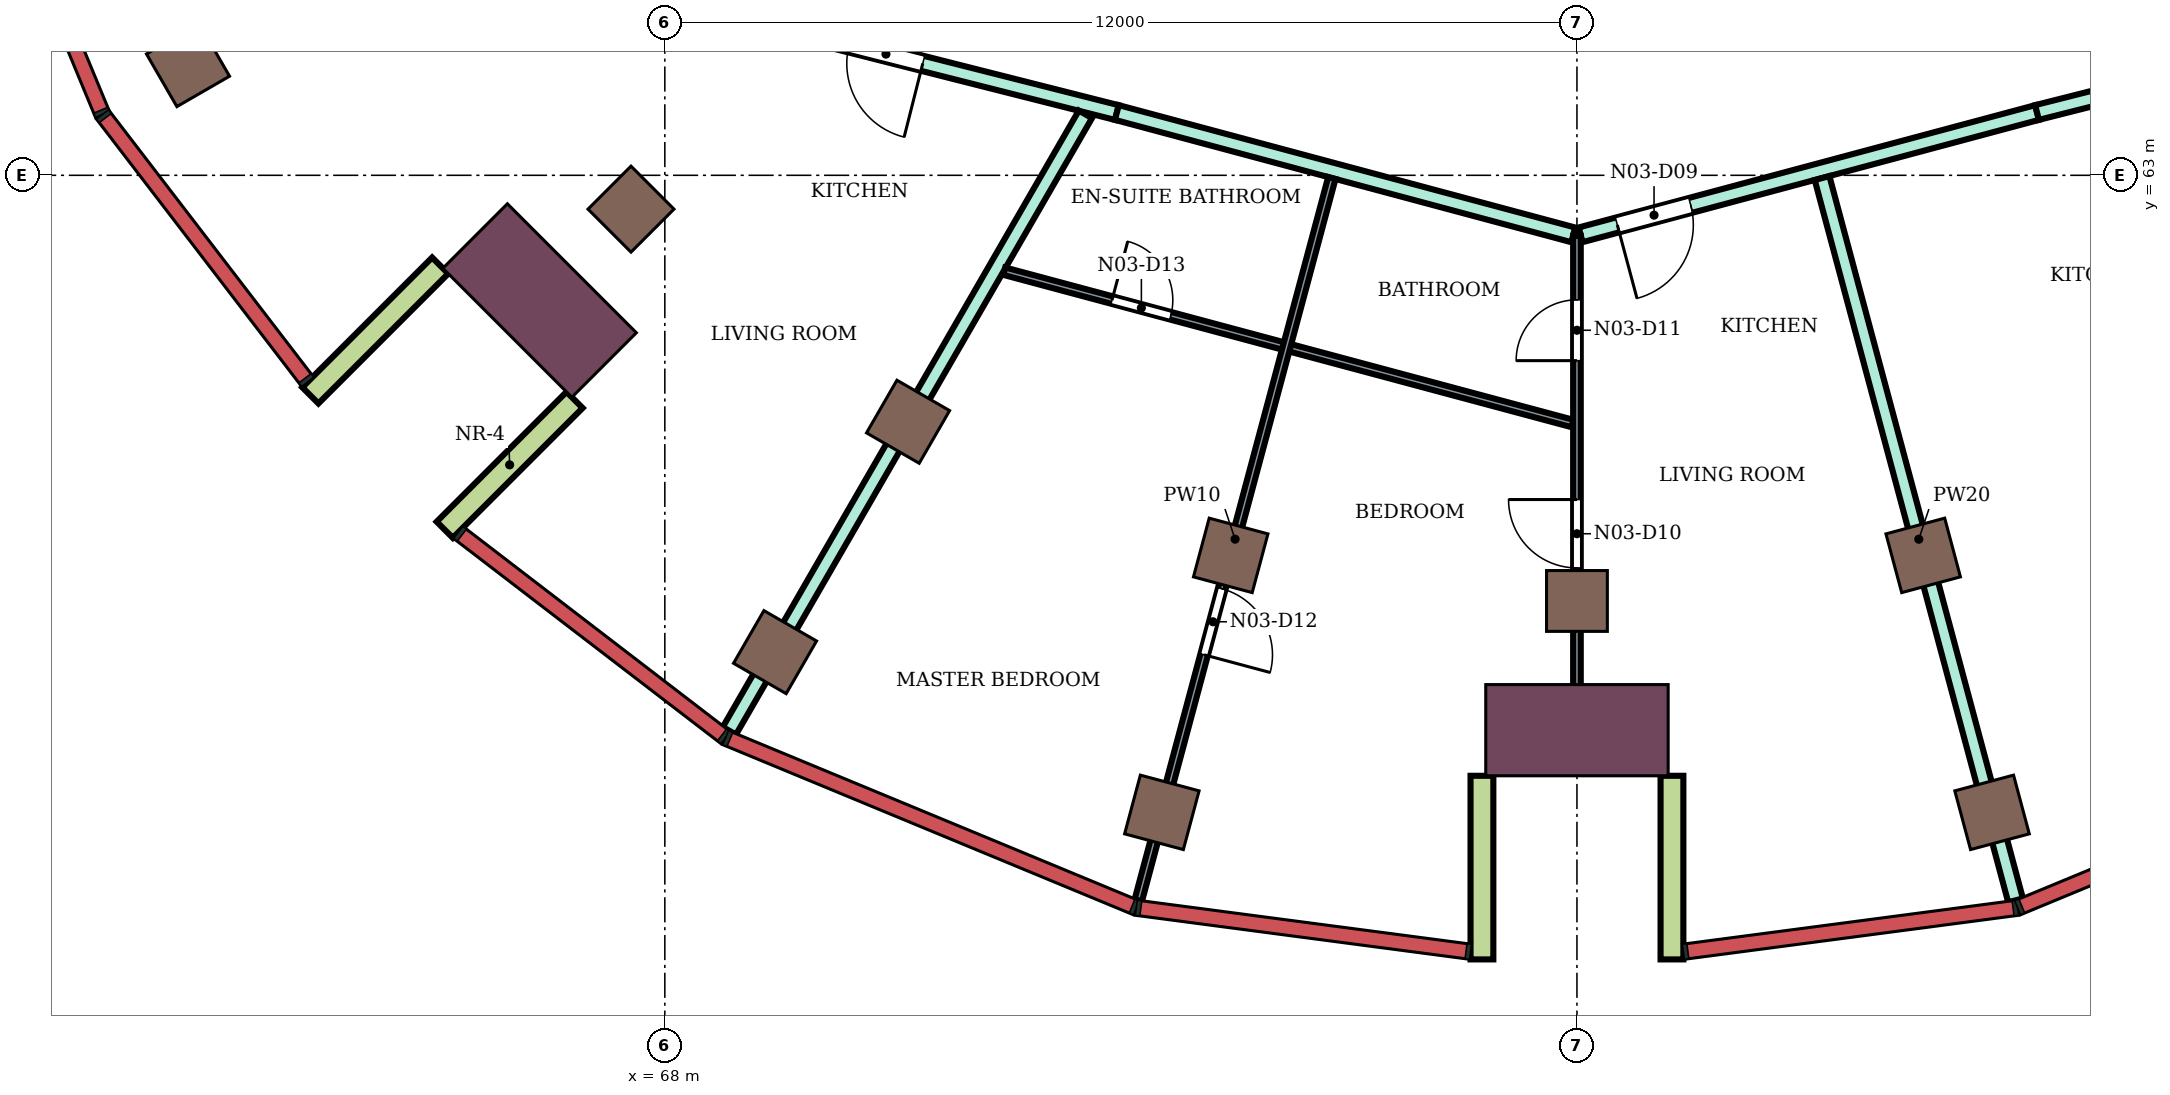
"""IFC4 building model, lengths in metres.
Left out: names, types, materials, properties, quantities, classifications, styles, units other than length and angle.
Written with IfcOpenShell. Run it as: python <this file> out.ifc"""

import sys

from ifc_helpers import new_model, si_unit, direction, frame, frame_2d, origin, origin_2d, place, context, subcontext, project, spatial, rectangle, extrude, element, fill, save


model = new_model("IFC4")
c1 = context("Model", 3, precision=1e-05, world=origin(), true_north=direction((0.0, 1.0)))
c2 = subcontext(c1, "Body", "Model", "MODEL_VIEW")
j1 = project(units=[si_unit("LENGTHUNIT", "METRE"), si_unit("PLANEANGLEUNIT", "RADIAN")], contexts=[c1])
p1 = place(None, origin())
s1 = spatial("IfcSite", under=j1, at=p1, CompositionType="ELEMENT")
p2 = place(p1, origin())
s2 = spatial("IfcBuilding", under=s1, at=p2, CompositionType="ELEMENT")
p3 = place(p2, frame((0.0, 0.0, 300.9)))
s3 = spatial("IfcBuildingStorey", under=s2, at=p3, CompositionType="ELEMENT", Elevation=300.9)
for number, where, z_axis, x_axis in (
    (1, (61.727, 64.45, 0.0), (0.0, 0.0, 1.0), (-0.866, -0.5, 0.0)),
    (2, (69.45, 56.727, 0.0), (0.0, 0.0, 1.0), (-0.5, -0.866, 0.0)),
    (3, (74.539, 54.619, 0.0), (0.0, 0.0, 1.0), (-0.259, -0.966, 0.0)),
    (4, (85.461, 54.619, 0.0), (0.0, 0.0, 1.0), (0.259, -0.966, 0.0)),
    (5, (67.555, 62.555, 0.0), (0.0, 0.0, 1.0), (-0.707, -0.707, 0.0)),
    (6, (71.2, 59.758, 0.0), (0.0, 0.0, 1.0), (-0.5, -0.866, 0.0)),
    (7, (75.445, 58.0, 0.0), (0.0, 0.0, 1.0), (-0.259, -0.966, 0.0)),
    (8, (80.0, 57.4, 0.0), (0.0, 0.0, 1.0), (0.0, -1.0, 0.0)),
    (9, (84.555, 58.0, 0.0), (0.0, 0.0, 1.0), (0.259, -0.966, 0.0)),
):
    element("IfcColumn", number, at=place(p3, frame(where, z_axis=z_axis, x_axis=x_axis)), inside=s3, PredefinedType="COLUMN", context=c2, shape_type="SweptSolid", body=[
        extrude(rectangle(XDim=0.8, YDim=0.8, at=origin_2d()), origin(), (0.0, 0.0, 1.0), 4.2),
    ])
for number, where, z_axis, x_axis in (
    (10, (66.353, 61.353, 0.0), (0.0, 0.0, 1.0), (-0.707, -0.707, 0.0)),
    (11, (80.0, 55.7, 0.0), (0.0, 0.0, 1.0), (0.0, -1.0, 0.0)),
):
    element("IfcColumn", number, at=place(p3, frame(where, z_axis=z_axis, x_axis=x_axis)), inside=s3, PredefinedType="COLUMN", context=c2, shape_type="SweptSolid", body=[
        extrude(rectangle(XDim=1.2, YDim=2.4, at=origin_2d()), origin(), (0.0, 0.0, 1.0), 4.2),
    ])
for number, where, z_axis, x_axis in (
    (12, (65.045, 61.812, 0.0), (0.0, 0.0, 1.0), (-0.707, -0.707, 0.0)),
    (13, (66.812, 60.045, 0.0), (0.0, 0.0, 1.0), (-0.707, -0.707, 0.0)),
    (14, (78.75, 55.1, 0.0), (0.0, 0.0, 1.0), (0.0, -1.0, 0.0)),
    (15, (81.25, 55.1, 0.0), (0.0, 0.0, 1.0), (0.0, -1.0, 0.0)),
):
    element("IfcWall", number, at=place(p3, frame(where, z_axis=z_axis, x_axis=x_axis)), inside=s3, PredefinedType="NOTDEFINED", context=c2, shape_type="SweptSolid", body=[
        extrude(rectangle(XDim=2.416, YDim=0.3, at=frame_2d((1.208, 0.0))), origin(), (0.0, 0.0, 1.0), 4.2),
    ])
p4 = place(p3, frame((68.201, 65.28, 0.0), z_axis=(0.0, 0.0, 1.0), x_axis=(0.969421088032, -0.245403247897, 0.0)))
e16 = element("IfcWall", 16, at=p4, inside=s3, PredefinedType="PARTITIONING", context=c2, shape_type="SweptSolid", body=[
    extrude(rectangle(XDim=5.927, YDim=0.2, at=frame_2d((2.964, 0.0))), origin(), (0.0, 0.0, 1.0), 3.75),
])
p5 = place(p4, frame((2.293, 0.0, 0.0)))
e17 = element("IfcOpeningElement", 17, at=p5, cuts=e16, PredefinedType="OPENING", context=c2, shape_type="SweptSolid", body=[
    extrude(rectangle(XDim=1.0, YDim=2.1, at=frame_2d((0.5, 1.05))), frame((0.0, 0.11, 0.0), z_axis=(0.0, -1.0, 0.0), x_axis=(1.0, 0.0, 0.0)), (0.0, 0.0, 1.0), 0.22),
])
p6 = place(p3, frame((68.849, 55.692, 0.0), z_axis=(0.0, 0.0, 1.0), x_axis=(0.50011732958, 0.865957652922, 0.0)))
e18 = element("IfcWall", 18, at=p6, inside=s3, PredefinedType="PARTITIONING", context=c2, shape_type="SweptSolid", body=[
    extrude(rectangle(XDim=9.365, YDim=0.2, at=frame_2d((4.683, 0.0))), origin(), (0.0, 0.0, 1.0), 3.75),
])
p7 = place(p3, frame((73.947, 63.826, 0.0), z_axis=(0.0, 0.0, 1.0), x_axis=(0.965908253407, -0.258884619088, 0.0)))
e19 = element("IfcWall", 19, at=p7, inside=s3, PredefinedType="PARTITIONING", context=c2, shape_type="SweptSolid", body=[
    extrude(rectangle(XDim=6.217, YDim=0.2, at=frame_2d((3.108, 0.0))), origin(), (0.0, 0.0, 1.0), 3.75),
])
p8 = place(p3, frame((80.048, 62.217, 0.0), z_axis=(0.0, 0.0, 1.0), x_axis=(0.965937709386, 0.258774692708, 0.0)))
e20 = element("IfcWall", 20, at=p8, inside=s3, PredefinedType="PARTITIONING", context=c2, shape_type="SweptSolid", body=[
    extrude(rectangle(XDim=6.216, YDim=0.2, at=frame_2d((3.108, 0.0))), origin(), (0.0, 0.0, 1.0), 3.75),
])
p9 = place(p8, frame((0.5, 0.0, 0.0)))
e21 = element("IfcOpeningElement", 21, at=p9, cuts=e20, PredefinedType="OPENING", context=c2, shape_type="SweptSolid", body=[
    extrude(rectangle(XDim=1.0, YDim=2.1, at=frame_2d((0.5, 1.05))), frame((0.0, 0.11, 0.0), z_axis=(0.0, -1.0, 0.0), x_axis=(1.0, 0.0, 0.0)), (0.0, 0.0, 1.0), 0.22),
])
p10 = place(p3, frame((83.225, 62.963, 0.0), z_axis=(0.0, 0.0, 1.0), x_axis=(0.258782398991, -0.96593564484, 0.0)))
e22 = element("IfcWall", 22, at=p10, inside=s3, PredefinedType="PARTITIONING", context=c2, shape_type="SweptSolid", body=[
    extrude(rectangle(XDim=9.837, YDim=0.2, at=frame_2d((4.918, 0.0))), origin(), (0.0, 0.0, 1.0), 3.75),
])
p11 = place(p3, frame((86.053, 63.826, 0.0), z_axis=(0.0, 0.0, 1.0), x_axis=(0.969480070232, 0.245170131586, 0.0)))
e23 = element("IfcWall", 23, at=p11, inside=s3, PredefinedType="PARTITIONING", context=c2, shape_type="SweptSolid", body=[
    extrude(rectangle(XDim=5.907, YDim=0.2, at=frame_2d((2.954, 0.0))), origin(), (0.0, 0.0, 1.0), 3.75),
])
p12 = place(p11, frame((2.464, 0.0, 0.0)))
e24 = element("IfcOpeningElement", 24, at=p12, cuts=e23, PredefinedType="OPENING", context=c2, shape_type="SweptSolid", body=[
    extrude(rectangle(XDim=1.0, YDim=2.1, at=frame_2d((0.5, 1.05))), frame((0.0, 0.11, 0.0), z_axis=(0.0, -1.0, 0.0), x_axis=(1.0, 0.0, 0.0)), (0.0, 0.0, 1.0), 0.22),
])
p13 = place(p3, frame((72.465, 61.739, 0.0), z_axis=(0.0, 0.0, 1.0), x_axis=(0.965899611634, -0.258916859715, 0.0)))
e25 = element("IfcWall", 25, at=p13, inside=s3, PredefinedType="PARTITIONING", context=c2, shape_type="SweptSolid", body=[
    extrude(rectangle(XDim=7.74, YDim=0.1, at=frame_2d((3.87, 0.0))), origin(), (0.0, 0.0, 1.0), 3.75),
])
p14 = place(p13, frame((1.468, 0.0, 0.0)))
e26 = element("IfcOpeningElement", 26, at=p14, cuts=e25, PredefinedType="OPENING", context=c2, shape_type="SweptSolid", body=[
    extrude(rectangle(XDim=0.8, YDim=2.1, at=frame_2d((0.4, 1.05))), frame((0.0, 0.06, 0.0), z_axis=(0.0, -1.0, 0.0), x_axis=(1.0, 0.0, 0.0)), (0.0, 0.0, 1.0), 0.12),
])
p15 = place(p3, frame((74.229, 53.462, 0.0), z_axis=(0.0, 0.0, 1.0), x_axis=(0.258810097991, 0.965928223616, 0.0)))
e27 = element("IfcWall", 27, at=p15, inside=s3, PredefinedType="PARTITIONING", context=c2, shape_type="SweptSolid", body=[
    extrude(rectangle(XDim=9.838, YDim=0.1, at=frame_2d((4.919, 0.0))), origin(), (0.0, 0.0, 1.0), 3.75),
])
p16 = place(p15, frame((3.344, 0.0, 0.0)))
e28 = element("IfcOpeningElement", 28, at=p16, cuts=e27, PredefinedType="OPENING", context=c2, shape_type="SweptSolid", body=[
    extrude(rectangle(XDim=0.9, YDim=2.1, at=frame_2d((0.45, 1.05))), frame((0.0, 0.06, 0.0), z_axis=(0.0, -1.0, 0.0), x_axis=(1.0, 0.0, 0.0)), (0.0, 0.0, 1.0), 0.12),
])
p17 = place(p3, frame((80.0, 55.3, 0.0), z_axis=(0.0, 0.0, 1.0), x_axis=(0.0, 1.0, 0.0)))
e29 = element("IfcWall", 29, at=p17, inside=s3, PredefinedType="PARTITIONING", context=c2, shape_type="SweptSolid", body=[
    extrude(rectangle(XDim=6.904, YDim=0.1, at=frame_2d((3.452, 0.0))), origin(), (0.0, 0.0, 1.0), 3.75),
])
p18 = place(p17, frame((2.534, 0.0, 0.0)))
e30 = element("IfcOpeningElement", 30, at=p18, cuts=e29, PredefinedType="OPENING", context=c2, shape_type="SweptSolid", body=[
    extrude(rectangle(XDim=0.9, YDim=2.1, at=frame_2d((0.45, 1.05))), frame((0.0, 0.06, 0.0), z_axis=(0.0, -1.0, 0.0), x_axis=(1.0, 0.0, 0.0)), (0.0, 0.0, 1.0), 0.12),
])
p19 = place(p17, frame((5.261, 0.0, 0.0)))
e31 = element("IfcOpeningElement", 31, at=p19, cuts=e29, PredefinedType="OPENING", context=c2, shape_type="SweptSolid", body=[
    extrude(rectangle(XDim=0.8, YDim=2.1, at=frame_2d((0.4, 1.05))), frame((0.0, 0.06, 0.0), z_axis=(0.0, -1.0, 0.0), x_axis=(1.0, 0.0, 0.0)), (0.0, 0.0, 1.0), 0.12),
])
p20 = place(p9, frame((1.0, 0.0, 0.0), z_axis=(0.0, 0.0, 1.0), x_axis=(-1.0, 0.0, 0.0)))
e32 = element("IfcDoor", 32, at=p20, inside=s3, OperationType="SINGLE_SWING_RIGHT", PredefinedType="DOOR", context=c2, shape_type="SweptSolid", body=[
    extrude(rectangle(XDim=1.0, YDim=2.1, at=frame_2d((0.5, 1.05))), frame((0.0, 0.025, 0.0), z_axis=(0.0, -1.0, 0.0), x_axis=(1.0, 0.0, 0.0)), (0.0, 0.0, 1.0), 0.05),
])
fill(e21, e32)
p21 = place(p18, origin())
e33 = element("IfcDoor", 33, at=p21, inside=s3, OperationType="SINGLE_SWING_RIGHT", PredefinedType="DOOR", context=c2, shape_type="SweptSolid", body=[
    extrude(rectangle(XDim=0.9, YDim=2.1, at=frame_2d((0.45, 1.05))), frame((0.0, 0.025, 0.0), z_axis=(0.0, -1.0, 0.0), x_axis=(1.0, 0.0, 0.0)), (0.0, 0.0, 1.0), 0.05),
])
fill(e30, e33)
p22 = place(p19, origin())
e34 = element("IfcDoor", 34, at=p22, inside=s3, OperationType="SINGLE_SWING_LEFT", PredefinedType="DOOR", context=c2, shape_type="SweptSolid", body=[
    extrude(rectangle(XDim=0.8, YDim=2.1, at=frame_2d((0.4, 1.05))), frame((0.0, 0.025, 0.0), z_axis=(0.0, -1.0, 0.0), x_axis=(1.0, 0.0, 0.0)), (0.0, 0.0, 1.0), 0.05),
])
fill(e31, e34)
p23 = place(p16, frame((0.9, 0.0, 0.0), z_axis=(0.0, 0.0, 1.0), x_axis=(-1.0, 0.0, 0.0)))
e35 = element("IfcDoor", 35, at=p23, inside=s3, OperationType="SINGLE_SWING_RIGHT", PredefinedType="DOOR", context=c2, shape_type="SweptSolid", body=[
    extrude(rectangle(XDim=0.9, YDim=2.1, at=frame_2d((0.45, 1.05))), frame((0.0, 0.025, 0.0), z_axis=(0.0, -1.0, 0.0), x_axis=(1.0, 0.0, 0.0)), (0.0, 0.0, 1.0), 0.05),
])
fill(e28, e35)
p24 = place(p14, origin())
e36 = element("IfcDoor", 36, at=p24, inside=s3, OperationType="SINGLE_SWING_LEFT", PredefinedType="DOOR", context=c2, shape_type="SweptSolid", body=[
    extrude(rectangle(XDim=0.8, YDim=2.1, at=frame_2d((0.4, 1.05))), frame((0.0, 0.025, 0.0), z_axis=(0.0, -1.0, 0.0), x_axis=(1.0, 0.0, 0.0)), (0.0, 0.0, 1.0), 0.05),
])
fill(e26, e36)
p25 = place(p5, frame((1.0, 0.0, 0.0), z_axis=(0.0, 0.0, 1.0), x_axis=(-1.0, 0.0, 0.0)))
e37 = element("IfcDoor", 37, at=p25, inside=s3, OperationType="SINGLE_SWING_LEFT", PredefinedType="DOOR", context=c2, shape_type="SweptSolid", body=[
    extrude(rectangle(XDim=1.0, YDim=2.1, at=frame_2d((0.5, 1.05))), frame((0.0, 0.025, 0.0), z_axis=(0.0, -1.0, 0.0), x_axis=(1.0, 0.0, 0.0)), (0.0, 0.0, 1.0), 0.05),
])
fill(e17, e37)
save(model, sys.argv[1])
